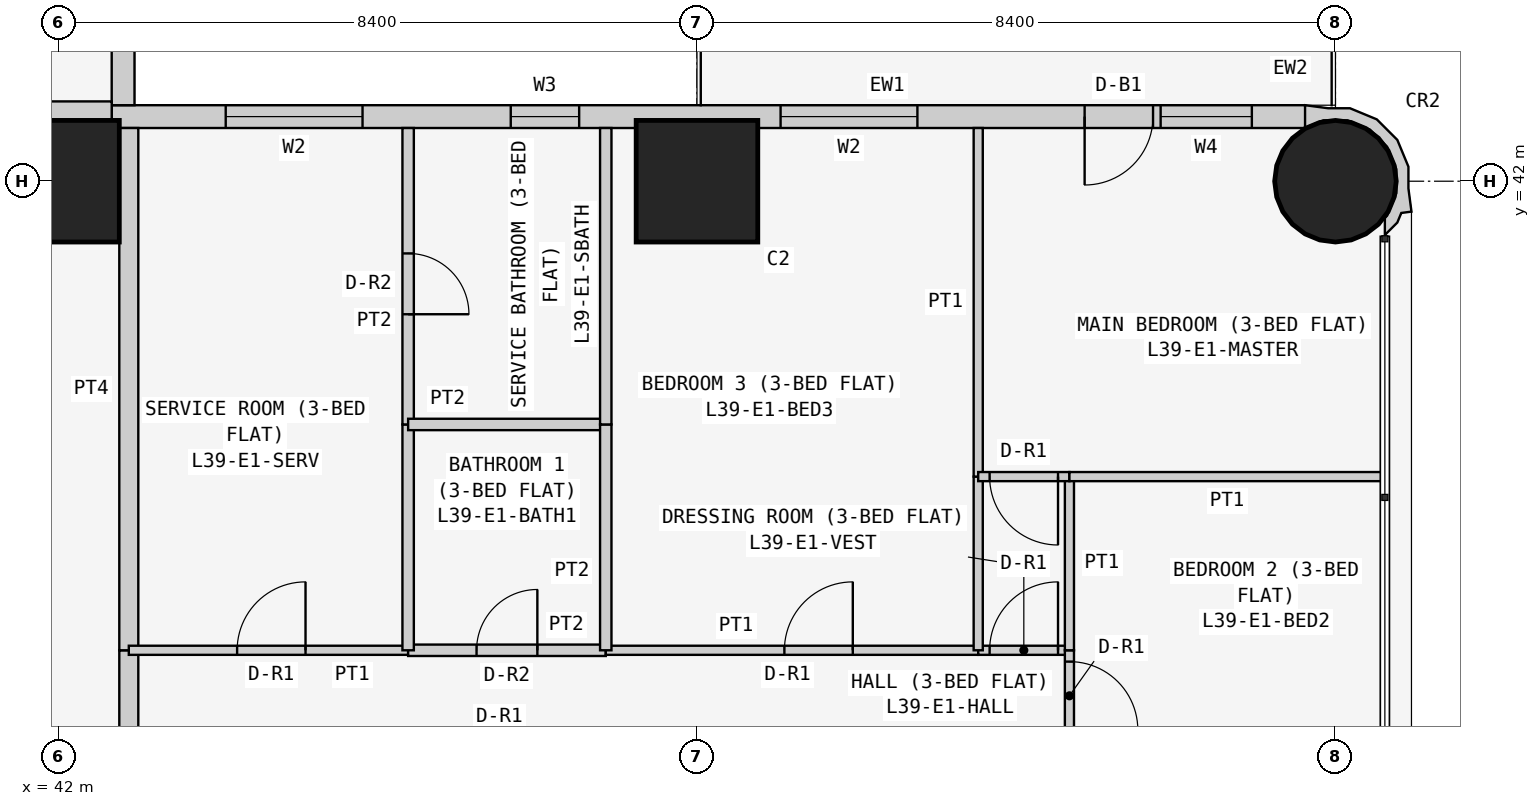
"""IFC4 building model, lengths in metres.
Left out: names, types, materials, properties, quantities, classifications, styles, units other than length and angle.
Written with IfcOpenShell. Run it as: python <this file> out.ifc"""

import sys

from ifc_helpers import new_model, si_unit, direction, frame, frame_2d, origin, origin_2d, place, context, subcontext, project, spatial, polyline, rectangle, circle, outline, extrude, element, fill, save


model = new_model("IFC4")
c1 = context("Model", 3, precision=1e-05, world=origin(), true_north=direction((0.0, 1.0)))
c2 = subcontext(c1, "Body", "Model", "MODEL_VIEW")
j1 = project(units=[si_unit("LENGTHUNIT", "METRE"), si_unit("PLANEANGLEUNIT", "RADIAN")], contexts=[c1])
p1 = place(None, origin())
s1 = spatial("IfcSite", under=j1, at=p1, CompositionType="ELEMENT")
p2 = place(p1, origin())
s2 = spatial("IfcBuilding", under=s1, at=p2, CompositionType="ELEMENT")
p3 = place(p2, frame((0.0, 0.0, 152.1)))
s3 = spatial("IfcBuildingStorey", under=s2, at=p3, CompositionType="ELEMENT", Elevation=152.1)
for number, where, z_axis, x_axis in (
    (1, (42.0, 42.0, 0.0), (0.0, 0.0, 1.0), (1.0, 0.0, 0.0)),
    (2, (50.4, 42.0, 0.0), (0.0, 0.0, 1.0), (1.0, 0.0, 0.0)),
):
    element("IfcColumn", number, at=place(p3, frame(where, z_axis=z_axis, x_axis=x_axis)), inside=s3, PredefinedType="COLUMN", context=c2, shape_type="SweptSolid", body=[
        extrude(rectangle(XDim=1.6, YDim=1.6, at=origin_2d()), origin(), (0.0, 0.0, 1.0), 3.6),
    ])
p4 = place(p3, frame((58.8, 42.0, 0.0), z_axis=(0.0, 0.0, 1.0), x_axis=(1.0, 0.0, 0.0)))
e3 = element("IfcColumn", 3, at=p4, inside=s3, PredefinedType="COLUMN", context=c2, shape_type="SweptSolid", body=[
    extrude(circle(Radius=0.8, at=origin_2d()), origin(), (0.0, 0.0, 1.0), 3.6),
])
p5 = place(p3, frame((58.4, 42.85, 0.0), z_axis=(0.0, 0.0, 1.0), x_axis=(-1.0, 0.0, 0.0)))
e4 = element("IfcWall", 4, at=p5, inside=s3, PredefinedType="SOLIDWALL", context=c2, shape_type="SweptSolid", body=[
    extrude(rectangle(XDim=15.7, YDim=0.3, at=frame_2d((7.85, 0.0))), origin(), (0.0, 0.0, 1.0), 3.45),
])
p6 = place(p5, frame((12.4, 0.0, 0.9)))
e5 = element("IfcOpeningElement", 5, at=p6, cuts=e4, PredefinedType="OPENING", context=c2, shape_type="SweptSolid", body=[
    extrude(rectangle(XDim=1.8, YDim=1.5, at=frame_2d((0.9, 0.75))), frame((0.0, 0.16, 0.0), z_axis=(0.0, -1.0, 0.0), x_axis=(1.0, 0.0, 0.0)), (0.0, 0.0, 1.0), 0.32),
])
p7 = place(p5, frame((9.55, 0.0, 1.5)))
e6 = element("IfcOpeningElement", 6, at=p7, cuts=e4, PredefinedType="OPENING", context=c2, shape_type="SweptSolid", body=[
    extrude(rectangle(XDim=0.9, YDim=0.7, at=frame_2d((0.45, 0.35))), frame((0.0, 0.16, 0.0), z_axis=(0.0, -1.0, 0.0), x_axis=(1.0, 0.0, 0.0)), (0.0, 0.0, 1.0), 0.32),
])
p8 = place(p5, frame((5.1, 0.0, 0.9)))
e7 = element("IfcOpeningElement", 7, at=p8, cuts=e4, PredefinedType="OPENING", context=c2, shape_type="SweptSolid", body=[
    extrude(rectangle(XDim=1.8, YDim=1.5, at=frame_2d((0.9, 0.75))), frame((0.0, 0.16, 0.0), z_axis=(0.0, -1.0, 0.0), x_axis=(1.0, 0.0, 0.0)), (0.0, 0.0, 1.0), 0.32),
])
p9 = place(p5, frame((2.0, 0.0, 0.0)))
e8 = element("IfcOpeningElement", 8, at=p9, cuts=e4, PredefinedType="OPENING", context=c2, shape_type="SweptSolid", body=[
    extrude(rectangle(XDim=0.9, YDim=2.4, at=frame_2d((0.45, 1.2))), frame((0.0, 0.16, 0.0), z_axis=(0.0, -1.0, 0.0), x_axis=(1.0, 0.0, 0.0)), (0.0, 0.0, 1.0), 0.32),
])
p10 = place(p5, frame((0.7, 0.0, 0.9)))
e9 = element("IfcOpeningElement", 9, at=p10, cuts=e4, PredefinedType="OPENING", context=c2, shape_type="SweptSolid", body=[
    extrude(rectangle(XDim=1.2, YDim=1.5, at=frame_2d((0.6, 0.75))), frame((0.0, 0.16, 0.0), z_axis=(0.0, -1.0, 0.0), x_axis=(1.0, 0.0, 0.0)), (0.0, 0.0, 1.0), 0.32),
])
p11 = place(p3, frame((42.85, 43.0, 0.0), z_axis=(0.0, 0.0, 1.0), x_axis=(0.0, 1.0, 0.0)))
e10 = element("IfcWall", 10, at=p11, inside=s3, PredefinedType="SOLIDWALL", context=c2, shape_type="SweptSolid", body=[
    extrude(rectangle(XDim=7.0, YDim=0.3, at=frame_2d((3.5, 0.0))), origin(), (0.0, 0.0, 1.0), 3.45),
])
p12 = place(p11, frame((1.5, 0.0, 0.9)))
e11 = element("IfcOpeningElement", 11, at=p12, cuts=e10, PredefinedType="OPENING", context=c2, shape_type="SweptSolid", body=[
    extrude(rectangle(XDim=2.4, YDim=1.5, at=frame_2d((1.2, 0.75))), frame((0.0, 0.16, 0.0), z_axis=(0.0, -1.0, 0.0), x_axis=(1.0, 0.0, 0.0)), (0.0, 0.0, 1.0), 0.32),
])
p13 = place(p11, frame((5.05, 0.0, 0.9)))
e12 = element("IfcOpeningElement", 12, at=p13, cuts=e10, PredefinedType="OPENING", context=c2, shape_type="SweptSolid", body=[
    extrude(rectangle(XDim=1.2, YDim=1.5, at=frame_2d((0.6, 0.75))), frame((0.0, 0.16, 0.0), z_axis=(0.0, -1.0, 0.0), x_axis=(1.0, 0.0, 0.0)), (0.0, 0.0, 1.0), 0.32),
])
p14 = place(p3, frame((59.395, 41.352, 0.0), z_axis=(0.0, 0.0, 1.0), x_axis=(0.93923434088, 0.343276641956, 0.0)))
e13 = element("IfcWall", 13, at=p14, inside=s3, PredefinedType="SOLIDWALL", context=c2, shape_type="SweptSolid", body=[
    extrude(outline(polyline([(0.532, 0.393), (0.631, 0.663), (0.614, 1.044), (0.453, 1.391), (0.172, 1.649), (-0.097, 1.748), (-0.369, 1.89), (-0.509, 1.621), (-0.491, 1.615), (-0.479, 1.609), (-0.211, 1.62), (0.088, 1.511), (0.323, 1.295), (0.457, 1.006), (0.47, 0.688), (0.361, 0.389), (0.145, 0.154), (0.108, 0.136), (0.031, -0.075), (0.241, 0.023), (0.333, 0.124), (0.465, 0.094), (0.532, 0.393)])), origin(), (0.0, 0.0, 1.0), 3.45),
])
p15 = place(p3, frame((36.229, 42.925, 0.0), z_axis=(0.0, 0.0, 1.0), x_axis=(1.0, 0.0, 0.0)))
e14 = element("IfcWall", 14, at=p15, inside=s3, PredefinedType="PARTITIONING", context=c2, shape_type="SweptSolid", body=[
    extrude(rectangle(XDim=6.471, YDim=0.25, at=frame_2d((3.235, 0.0))), origin(), (0.0, 0.0, 1.0), 3.45),
])
p16 = place(p3, frame((42.925, 35.829, 0.0), z_axis=(0.0, 0.0, 1.0), x_axis=(0.0, -1.0, 0.0)))
e15 = element("IfcWall", 15, at=p16, inside=s3, PredefinedType="PARTITIONING", context=c2, shape_type="SweptSolid", body=[
    extrude(rectangle(XDim=1.2, YDim=0.25, at=frame_2d((0.6, 0.0))), origin(), (0.0, 0.0, 1.0), 3.45),
])
p17 = place(p3, frame((42.925, 42.7, 0.0), z_axis=(0.0, 0.0, 1.0), x_axis=(0.0, -1.0, 0.0)))
e16 = element("IfcWall", 16, at=p17, inside=s3, PredefinedType="PARTITIONING", context=c2, shape_type="SweptSolid", body=[
    extrude(rectangle(XDim=6.871, YDim=0.25, at=frame_2d((3.436, 0.0))), origin(), (0.0, 0.0, 1.0), 3.45),
])
p18 = place(p3, frame((46.6, 35.829, 0.0), z_axis=(0.0, 0.0, 1.0), x_axis=(-1.0, 0.0, 0.0)))
e17 = element("IfcWall", 17, at=p18, inside=s3, PredefinedType="PARTITIONING", context=c2, shape_type="SweptSolid", body=[
    extrude(rectangle(XDim=3.675, YDim=0.12, at=frame_2d((1.837, 0.0))), origin(), (0.0, 0.0, 1.0), 3.45),
])
p19 = place(p18, frame((1.35, 0.0, 0.0)))
e18 = element("IfcOpeningElement", 18, at=p19, cuts=e17, PredefinedType="OPENING", context=c2, shape_type="SweptSolid", body=[
    extrude(rectangle(XDim=0.9, YDim=2.1, at=frame_2d((0.45, 1.05))), frame((0.0, 0.07, 0.0), z_axis=(0.0, -1.0, 0.0), x_axis=(1.0, 0.0, 0.0)), (0.0, 0.0, 1.0), 0.14),
])
p20 = place(p3, frame((49.2, 35.829, 0.0), z_axis=(0.0, 0.0, 1.0), x_axis=(-1.0, 0.0, 0.0)))
e19 = element("IfcWall", 19, at=p20, inside=s3, PredefinedType="PARTITIONING", context=c2, shape_type="SweptSolid", body=[
    extrude(rectangle(XDim=2.6, YDim=0.15, at=frame_2d((1.3, 0.0))), origin(), (0.0, 0.0, 1.0), 3.45),
])
p21 = place(p20, frame((0.9, 0.0, 0.0)))
e20 = element("IfcOpeningElement", 20, at=p21, cuts=e19, PredefinedType="OPENING", context=c2, shape_type="SweptSolid", body=[
    extrude(rectangle(XDim=0.8, YDim=2.1, at=frame_2d((0.4, 1.05))), frame((0.0, 0.085, 0.0), z_axis=(0.0, -1.0, 0.0), x_axis=(1.0, 0.0, 0.0)), (0.0, 0.0, 1.0), 0.17),
])
p22 = place(p3, frame((54.1, 35.829, 0.0), z_axis=(0.0, 0.0, 1.0), x_axis=(-1.0, 0.0, 0.0)))
e21 = element("IfcWall", 21, at=p22, inside=s3, PredefinedType="PARTITIONING", context=c2, shape_type="SweptSolid", body=[
    extrude(rectangle(XDim=4.9, YDim=0.12, at=frame_2d((2.45, 0.0))), origin(), (0.0, 0.0, 1.0), 3.45),
])
p23 = place(p22, frame((1.65, 0.0, 0.0)))
e22 = element("IfcOpeningElement", 22, at=p23, cuts=e21, PredefinedType="OPENING", context=c2, shape_type="SweptSolid", body=[
    extrude(rectangle(XDim=0.9, YDim=2.1, at=frame_2d((0.45, 1.05))), frame((0.0, 0.07, 0.0), z_axis=(0.0, -1.0, 0.0), x_axis=(1.0, 0.0, 0.0)), (0.0, 0.0, 1.0), 0.14),
])
p24 = place(p3, frame((55.3, 35.829, 0.0), z_axis=(0.0, 0.0, 1.0), x_axis=(-1.0, 0.0, 0.0)))
e23 = element("IfcWall", 23, at=p24, inside=s3, PredefinedType="PARTITIONING", context=c2, shape_type="SweptSolid", body=[
    extrude(rectangle(XDim=1.2, YDim=0.12, at=frame_2d((0.6, 0.0))), origin(), (0.0, 0.0, 1.0), 3.45),
])
p25 = place(p24, frame((0.15, 0.0, 0.0)))
e24 = element("IfcOpeningElement", 24, at=p25, cuts=e23, PredefinedType="OPENING", context=c2, shape_type="SweptSolid", body=[
    extrude(rectangle(XDim=0.9, YDim=2.1, at=frame_2d((0.45, 1.05))), frame((0.0, 0.07, 0.0), z_axis=(0.0, -1.0, 0.0), x_axis=(1.0, 0.0, 0.0)), (0.0, 0.0, 1.0), 0.14),
])
p26 = place(p3, frame((55.3, 34.629, 0.0), z_axis=(0.0, 0.0, 1.0), x_axis=(0.0, 1.0, 0.0)))
e25 = element("IfcWall", 25, at=p26, inside=s3, PredefinedType="PARTITIONING", context=c2, shape_type="SweptSolid", body=[
    extrude(rectangle(XDim=1.2, YDim=0.12, at=frame_2d((0.6, 0.0))), origin(), (0.0, 0.0, 1.0), 3.45),
])
p27 = place(p26, frame((0.151, 0.0, 0.0)))
e26 = element("IfcOpeningElement", 26, at=p27, cuts=e25, PredefinedType="OPENING", context=c2, shape_type="SweptSolid", body=[
    extrude(rectangle(XDim=0.9, YDim=2.1, at=frame_2d((0.45, 1.05))), frame((0.0, 0.07, 0.0), z_axis=(0.0, -1.0, 0.0), x_axis=(1.0, 0.0, 0.0)), (0.0, 0.0, 1.0), 0.14),
])
p28 = place(p3, frame((46.6, 35.829, 0.0), z_axis=(0.0, 0.0, 1.0), x_axis=(0.0, 1.0, 0.0)))
e27 = element("IfcWall", 27, at=p28, inside=s3, PredefinedType="PARTITIONING", context=c2, shape_type="SweptSolid", body=[
    extrude(rectangle(XDim=2.971, YDim=0.15, at=frame_2d((1.485, 0.0))), origin(), (0.0, 0.0, 1.0), 3.45),
])
p29 = place(p3, frame((46.6, 38.8, 0.0), z_axis=(0.0, 0.0, 1.0), x_axis=(0.0, 1.0, 0.0)))
e28 = element("IfcWall", 28, at=p29, inside=s3, PredefinedType="PARTITIONING", context=c2, shape_type="SweptSolid", body=[
    extrude(rectangle(XDim=3.9, YDim=0.15, at=frame_2d((1.95, 0.0))), origin(), (0.0, 0.0, 1.0), 3.45),
])
p30 = place(p29, frame((1.45, 0.0, 0.0)))
e29 = element("IfcOpeningElement", 29, at=p30, cuts=e28, PredefinedType="OPENING", context=c2, shape_type="SweptSolid", body=[
    extrude(rectangle(XDim=0.8, YDim=2.1, at=frame_2d((0.4, 1.05))), frame((0.0, 0.085, 0.0), z_axis=(0.0, -1.0, 0.0), x_axis=(1.0, 0.0, 0.0)), (0.0, 0.0, 1.0), 0.17),
])
p31 = place(p3, frame((49.2, 38.8, 0.0), z_axis=(0.0, 0.0, 1.0), x_axis=(-1.0, 0.0, 0.0)))
e30 = element("IfcWall", 30, at=p31, inside=s3, PredefinedType="PARTITIONING", context=c2, shape_type="SweptSolid", body=[
    extrude(rectangle(XDim=2.6, YDim=0.15, at=frame_2d((1.3, 0.0))), origin(), (0.0, 0.0, 1.0), 3.45),
])
p32 = place(p3, frame((49.2, 35.829, 0.0), z_axis=(0.0, 0.0, 1.0), x_axis=(0.0, 1.0, 0.0)))
e31 = element("IfcWall", 31, at=p32, inside=s3, PredefinedType="PARTITIONING", context=c2, shape_type="SweptSolid", body=[
    extrude(rectangle(XDim=2.971, YDim=0.15, at=frame_2d((1.485, 0.0))), origin(), (0.0, 0.0, 1.0), 3.45),
])
p33 = place(p3, frame((49.2, 38.8, 0.0), z_axis=(0.0, 0.0, 1.0), x_axis=(0.0, 1.0, 0.0)))
e32 = element("IfcWall", 32, at=p33, inside=s3, PredefinedType="PARTITIONING", context=c2, shape_type="SweptSolid", body=[
    extrude(rectangle(XDim=3.9, YDim=0.15, at=frame_2d((1.95, 0.0))), origin(), (0.0, 0.0, 1.0), 3.45),
])
p34 = place(p3, frame((54.1, 35.829, 0.0), z_axis=(0.0, 0.0, 1.0), x_axis=(0.0, 1.0, 0.0)))
e33 = element("IfcWall", 33, at=p34, inside=s3, PredefinedType="PARTITIONING", context=c2, shape_type="SweptSolid", body=[
    extrude(rectangle(XDim=2.285, YDim=0.12, at=frame_2d((1.143, 0.0))), origin(), (0.0, 0.0, 1.0), 3.45),
])
p35 = place(p3, frame((54.1, 38.114, 0.0), z_axis=(0.0, 0.0, 1.0), x_axis=(0.0, 1.0, 0.0)))
e34 = element("IfcWall", 34, at=p35, inside=s3, PredefinedType="PARTITIONING", context=c2, shape_type="SweptSolid", body=[
    extrude(rectangle(XDim=4.586, YDim=0.12, at=frame_2d((2.293, 0.0))), origin(), (0.0, 0.0, 1.0), 3.45),
])
p36 = place(p3, frame((55.3, 35.829, 0.0), z_axis=(0.0, 0.0, 1.0), x_axis=(0.0, 1.0, 0.0)))
e35 = element("IfcWall", 35, at=p36, inside=s3, PredefinedType="PARTITIONING", context=c2, shape_type="SweptSolid", body=[
    extrude(rectangle(XDim=2.285, YDim=0.12, at=frame_2d((1.143, 0.0))), origin(), (0.0, 0.0, 1.0), 3.45),
])
p37 = place(p3, frame((55.3, 38.114, 0.0), z_axis=(0.0, 0.0, 1.0), x_axis=(-1.0, 0.0, 0.0)))
e36 = element("IfcWall", 36, at=p37, inside=s3, PredefinedType="PARTITIONING", context=c2, shape_type="SweptSolid", body=[
    extrude(rectangle(XDim=1.2, YDim=0.12, at=frame_2d((0.6, 0.0))), origin(), (0.0, 0.0, 1.0), 3.45),
])
p38 = place(p37, frame((0.15, 0.0, 0.0)))
e37 = element("IfcOpeningElement", 37, at=p38, cuts=e36, PredefinedType="OPENING", context=c2, shape_type="SweptSolid", body=[
    extrude(rectangle(XDim=0.9, YDim=2.1, at=frame_2d((0.45, 1.05))), frame((0.0, 0.07, 0.0), z_axis=(0.0, -1.0, 0.0), x_axis=(1.0, 0.0, 0.0)), (0.0, 0.0, 1.0), 0.14),
])
p39 = place(p3, frame((59.45, 38.114, 0.0), z_axis=(0.0, 0.0, 1.0), x_axis=(-1.0, 0.0, 0.0)))
e38 = element("IfcWall", 38, at=p39, inside=s3, PredefinedType="PARTITIONING", context=c2, shape_type="SweptSolid", body=[
    extrude(rectangle(XDim=4.15, YDim=0.12, at=frame_2d((2.075, 0.0))), origin(), (0.0, 0.0, 1.0), 3.45),
])
p40 = place(p6, origin())
e39 = element("IfcWindow", 39, at=p40, inside=s3, PartitioningType="SINGLE_PANEL", PredefinedType="WINDOW", context=c2, shape_type="SweptSolid", body=[
    extrude(rectangle(XDim=1.8, YDim=1.5, at=frame_2d((0.9, 0.75))), frame((0.0, 0.03, 0.0), z_axis=(0.0, -1.0, 0.0), x_axis=(1.0, 0.0, 0.0)), (0.0, 0.0, 1.0), 0.06),
])
fill(e5, e39)
p41 = place(p7, origin())
e40 = element("IfcWindow", 40, at=p41, inside=s3, PartitioningType="SINGLE_PANEL", PredefinedType="WINDOW", context=c2, shape_type="SweptSolid", body=[
    extrude(rectangle(XDim=0.9, YDim=0.7, at=frame_2d((0.45, 0.35))), frame((0.0, 0.03, 0.0), z_axis=(0.0, -1.0, 0.0), x_axis=(1.0, 0.0, 0.0)), (0.0, 0.0, 1.0), 0.06),
])
fill(e6, e40)
p42 = place(p8, origin())
e41 = element("IfcWindow", 41, at=p42, inside=s3, PartitioningType="SINGLE_PANEL", PredefinedType="WINDOW", context=c2, shape_type="SweptSolid", body=[
    extrude(rectangle(XDim=1.8, YDim=1.5, at=frame_2d((0.9, 0.75))), frame((0.0, 0.03, 0.0), z_axis=(0.0, -1.0, 0.0), x_axis=(1.0, 0.0, 0.0)), (0.0, 0.0, 1.0), 0.06),
])
fill(e7, e41)
p43 = place(p9, origin())
e42 = element("IfcDoor", 42, at=p43, inside=s3, OperationType="SINGLE_SWING_RIGHT", PredefinedType="DOOR", context=c2, shape_type="SweptSolid", body=[
    extrude(rectangle(XDim=0.9, YDim=2.4, at=frame_2d((0.45, 1.2))), frame((0.0, 0.025, 0.0), z_axis=(0.0, -1.0, 0.0), x_axis=(1.0, 0.0, 0.0)), (0.0, 0.0, 1.0), 0.05),
])
fill(e8, e42)
p44 = place(p10, origin())
e43 = element("IfcWindow", 43, at=p44, inside=s3, PartitioningType="SINGLE_PANEL", PredefinedType="WINDOW", context=c2, shape_type="SweptSolid", body=[
    extrude(rectangle(XDim=1.2, YDim=1.5, at=frame_2d((0.6, 0.75))), frame((0.0, 0.03, 0.0), z_axis=(0.0, -1.0, 0.0), x_axis=(1.0, 0.0, 0.0)), (0.0, 0.0, 1.0), 0.06),
])
fill(e9, e43)
p45 = place(p19, frame((0.9, 0.0, 0.0), z_axis=(0.0, 0.0, 1.0), x_axis=(-1.0, 0.0, 0.0)))
e44 = element("IfcDoor", 44, at=p45, inside=s3, OperationType="SINGLE_SWING_RIGHT", PredefinedType="DOOR", context=c2, shape_type="SweptSolid", body=[
    extrude(rectangle(XDim=0.9, YDim=2.1, at=frame_2d((0.45, 1.05))), frame((0.0, 0.025, 0.0), z_axis=(0.0, -1.0, 0.0), x_axis=(1.0, 0.0, 0.0)), (0.0, 0.0, 1.0), 0.05),
])
fill(e18, e44)
p46 = place(p30, frame((0.8, 0.0, 0.0), z_axis=(0.0, 0.0, 1.0), x_axis=(-1.0, 0.0, 0.0)))
e45 = element("IfcDoor", 45, at=p46, inside=s3, OperationType="SINGLE_SWING_RIGHT", PredefinedType="DOOR", context=c2, shape_type="SweptSolid", body=[
    extrude(rectangle(XDim=0.8, YDim=2.1, at=frame_2d((0.4, 1.05))), frame((0.0, 0.025, 0.0), z_axis=(0.0, -1.0, 0.0), x_axis=(1.0, 0.0, 0.0)), (0.0, 0.0, 1.0), 0.05),
])
fill(e29, e45)
p47 = place(p21, frame((0.8, 0.0, 0.0), z_axis=(0.0, 0.0, 1.0), x_axis=(-1.0, 0.0, 0.0)))
e46 = element("IfcDoor", 46, at=p47, inside=s3, OperationType="SINGLE_SWING_RIGHT", PredefinedType="DOOR", context=c2, shape_type="SweptSolid", body=[
    extrude(rectangle(XDim=0.8, YDim=2.1, at=frame_2d((0.4, 1.05))), frame((0.0, 0.025, 0.0), z_axis=(0.0, -1.0, 0.0), x_axis=(1.0, 0.0, 0.0)), (0.0, 0.0, 1.0), 0.05),
])
fill(e20, e46)
p48 = place(p23, frame((0.9, 0.0, 0.0), z_axis=(0.0, 0.0, 1.0), x_axis=(-1.0, 0.0, 0.0)))
e47 = element("IfcDoor", 47, at=p48, inside=s3, OperationType="SINGLE_SWING_RIGHT", PredefinedType="DOOR", context=c2, shape_type="SweptSolid", body=[
    extrude(rectangle(XDim=0.9, YDim=2.1, at=frame_2d((0.45, 1.05))), frame((0.0, 0.025, 0.0), z_axis=(0.0, -1.0, 0.0), x_axis=(1.0, 0.0, 0.0)), (0.0, 0.0, 1.0), 0.05),
])
fill(e22, e47)
p49 = place(p25, frame((0.9, 0.0, 0.0), z_axis=(0.0, 0.0, 1.0), x_axis=(-1.0, 0.0, 0.0)))
e48 = element("IfcDoor", 48, at=p49, inside=s3, OperationType="SINGLE_SWING_RIGHT", PredefinedType="DOOR", context=c2, shape_type="SweptSolid", body=[
    extrude(rectangle(XDim=0.9, YDim=2.1, at=frame_2d((0.45, 1.05))), frame((0.0, 0.025, 0.0), z_axis=(0.0, -1.0, 0.0), x_axis=(1.0, 0.0, 0.0)), (0.0, 0.0, 1.0), 0.05),
])
fill(e24, e48)
p50 = place(p38, origin())
e49 = element("IfcDoor", 49, at=p50, inside=s3, OperationType="SINGLE_SWING_LEFT", PredefinedType="DOOR", context=c2, shape_type="SweptSolid", body=[
    extrude(rectangle(XDim=0.9, YDim=2.1, at=frame_2d((0.45, 1.05))), frame((0.0, 0.025, 0.0), z_axis=(0.0, -1.0, 0.0), x_axis=(1.0, 0.0, 0.0)), (0.0, 0.0, 1.0), 0.05),
])
fill(e37, e49)
p51 = place(p27, frame((0.9, 0.0, 0.0), z_axis=(0.0, 0.0, 1.0), x_axis=(-1.0, 0.0, 0.0)))
e50 = element("IfcDoor", 50, at=p51, inside=s3, OperationType="SINGLE_SWING_RIGHT", PredefinedType="DOOR", context=c2, shape_type="SweptSolid", body=[
    extrude(rectangle(XDim=0.9, YDim=2.1, at=frame_2d((0.45, 1.05))), frame((0.0, 0.025, 0.0), z_axis=(0.0, -1.0, 0.0), x_axis=(1.0, 0.0, 0.0)), (0.0, 0.0, 1.0), 0.05),
])
fill(e26, e50)
save(model, sys.argv[1])
